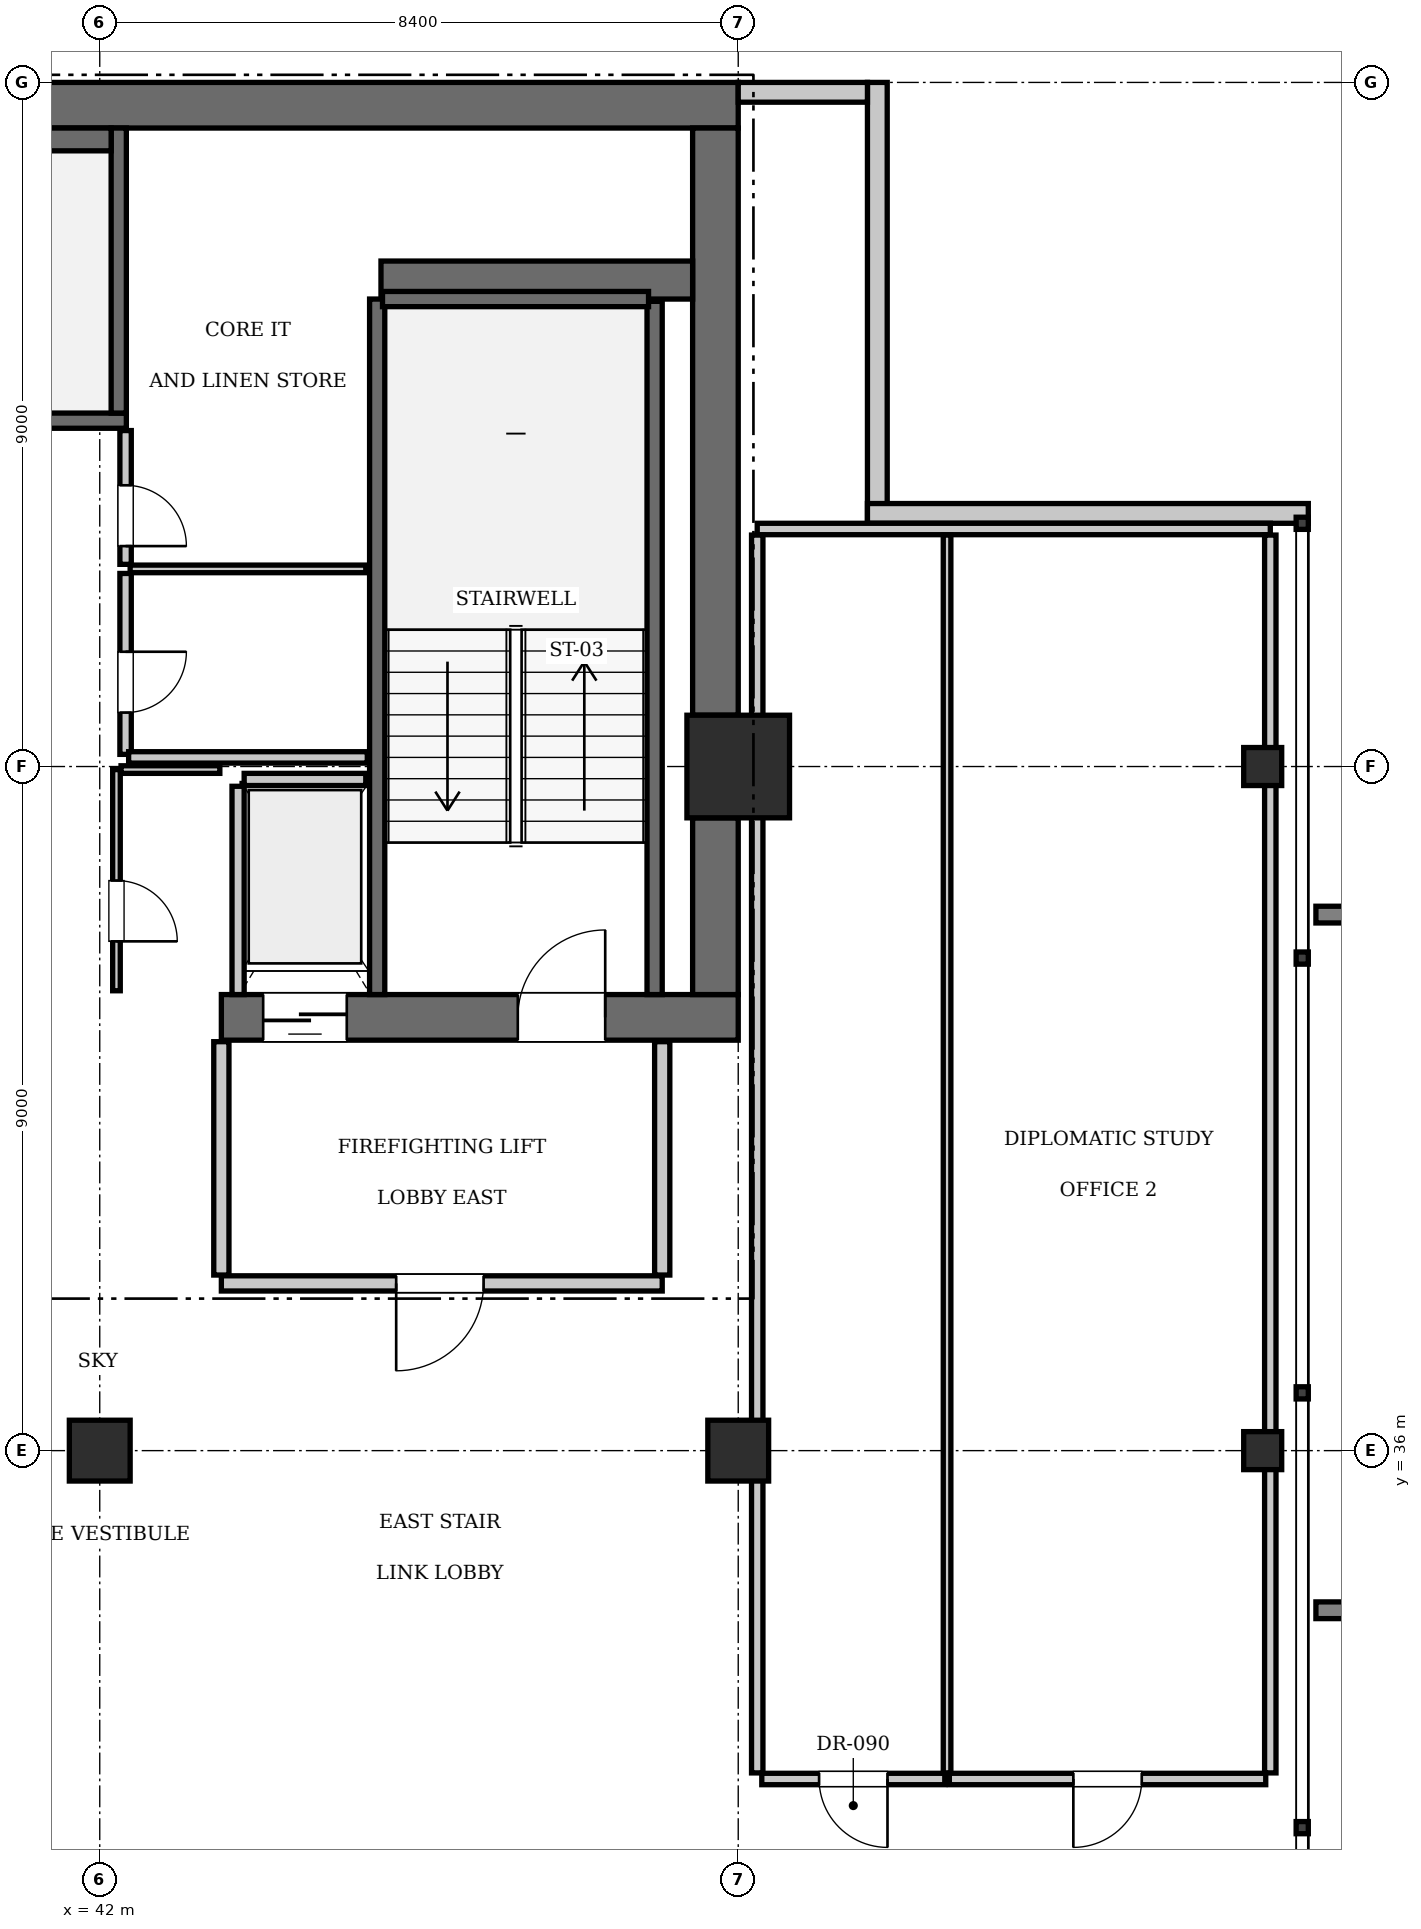
"""IFC4 building model, lengths in metres.
Left out: names, types, materials, properties, quantities, classifications, styles, units other than length and angle.
Written with IfcOpenShell. Run it as: python <this file> out.ifc"""

import sys

from ifc_helpers import new_model, si_unit, direction, frame, frame_2d, origin, origin_2d, place, context, subcontext, project, spatial, rectangle, i_section, extrude, element, fill, save


model = new_model("IFC4")
c1 = context("Model", 3, precision=1e-05, world=origin(), true_north=direction((0.0, 1.0)))
c2 = subcontext(c1, "Body", "Model", "MODEL_VIEW")
j1 = project(units=[si_unit("LENGTHUNIT", "METRE"), si_unit("PLANEANGLEUNIT", "RADIAN")], contexts=[c1])
p1 = place(None, origin())
s1 = spatial("IfcSite", under=j1, at=p1, CompositionType="ELEMENT")
p2 = place(p1, origin())
s2 = spatial("IfcBuilding", under=s1, at=p2, CompositionType="ELEMENT")
p3 = place(p2, frame((0.0, 0.0, 337.4)))
s3 = spatial("IfcBuildingStorey", under=s2, at=p3, CompositionType="ELEMENT", Elevation=337.4)
p4 = place(p3, frame((50.4, 45.0, 0.0), z_axis=(0.0, 0.0, 1.0), x_axis=(1.0, 0.0, 0.0)))
e1 = element("IfcColumn", 1, at=p4, inside=s3, PredefinedType="COLUMN", context=c2, shape_type="SweptSolid", body=[
    extrude(rectangle(XDim=1.35, YDim=1.35, at=origin_2d()), origin(), (0.0, 0.0, 1.0), 3.85),
])
p5 = place(p3, frame((25.2, 53.7, 0.0), z_axis=(0.0, 0.0, 1.0), x_axis=(1.0, 0.0, 0.0)))
e2 = element("IfcWall", 2, at=p5, inside=s3, PredefinedType="SHEAR", context=c2, shape_type="SweptSolid", body=[
    extrude(rectangle(XDim=25.2, YDim=0.6, at=frame_2d((12.6, 0.0))), origin(), (0.0, 0.0, 1.0), 3.85),
])
p6 = place(p3, frame((43.6, 41.7, 0.0), z_axis=(0.0, 0.0, 1.0), x_axis=(1.0, 0.0, 0.0)))
e3 = element("IfcWall", 3, at=p6, inside=s3, PredefinedType="SHEAR", context=c2, shape_type="SweptSolid", body=[
    extrude(rectangle(XDim=6.8, YDim=0.6, at=frame_2d((3.4, 0.0))), origin(), (0.0, 0.0, 1.0), 3.85),
])
p7 = place(p6, frame((3.9, 0.0, 0.0)))
e4 = element("IfcOpeningElement", 4, at=p7, cuts=e3, PredefinedType="OPENING", context=c2, shape_type="SweptSolid", body=[
    extrude(rectangle(XDim=1.15, YDim=2.15, at=frame_2d((0.575, 1.075))), frame((0.0, 0.31, 0.0), z_axis=(0.0, -1.0, 0.0), x_axis=(1.0, 0.0, 0.0)), (0.0, 0.0, 1.0), 0.62),
])
p8 = place(p6, frame((0.55, 0.0, 0.0)))
e5 = element("IfcOpeningElement", 5, at=p8, cuts=e3, PredefinedType="OPENING", context=c2, shape_type="SweptSolid", body=[
    extrude(rectangle(XDim=1.1, YDim=2.2, at=frame_2d((0.55, 1.1))), frame((0.0, 0.31, 0.0), z_axis=(0.0, -1.0, 0.0), x_axis=(1.0, 0.0, 0.0)), (0.0, 0.0, 1.0), 0.62),
])
p9 = place(p3, frame((50.1, 42.0, 0.0), z_axis=(0.0, 0.0, 1.0), x_axis=(0.0, 1.0, 0.0)))
e6 = element("IfcWall", 6, at=p9, inside=s3, PredefinedType="SHEAR", context=c2, shape_type="SweptSolid", body=[
    extrude(rectangle(XDim=2.325, YDim=0.6, at=frame_2d((1.163, 0.0))), origin(), (0.0, 0.0, 1.0), 3.85),
])
p10 = place(p3, frame((50.1, 45.675, 0.0), z_axis=(0.0, 0.0, 1.0), x_axis=(0.0, 1.0, 0.0)))
e7 = element("IfcWall", 7, at=p10, inside=s3, PredefinedType="SHEAR", context=c2, shape_type="SweptSolid", body=[
    extrude(rectangle(XDim=7.725, YDim=0.6, at=frame_2d((3.862, 0.0))), origin(), (0.0, 0.0, 1.0), 3.85),
])
p11 = place(p3, frame((45.7, 51.4, 0.0), z_axis=(0.0, 0.0, 1.0), x_axis=(1.0, 0.0, 0.0)))
e8 = element("IfcWall", 8, at=p11, inside=s3, PredefinedType="SHEAR", context=c2, shape_type="SweptSolid", body=[
    extrude(rectangle(XDim=4.1, YDim=0.5, at=frame_2d((2.05, 0.0))), origin(), (0.0, 0.0, 1.0), 3.85),
])
for number, where, z_axis, x_axis in (
    (9, (42.0, 36.0, 0.0), (0.0, 0.0, 1.0), (1.0, 0.0, 0.0)),
    (10, (50.4, 36.0, 0.0), (0.0, 0.0, 1.0), (1.0, 0.0, 0.0)),
):
    element("IfcColumn", number, at=place(p3, frame(where, z_axis=z_axis, x_axis=x_axis)), inside=s3, PredefinedType="COLUMN", context=c2, shape_type="SweptSolid", body=[
        extrude(rectangle(XDim=0.8, YDim=0.8, at=origin_2d()), origin(), (0.0, 0.0, 1.0), 3.85),
    ])
for number, where, z_axis, x_axis in (
    (11, (57.3, 36.0, 0.0), (0.0, 0.0, 1.0), (1.0, 0.0, 0.0)),
    (12, (57.3, 45.0, 0.0), (0.0, 0.0, 1.0), (1.0, 0.0, 0.0)),
):
    element("IfcColumn", number, at=place(p3, frame(where, z_axis=z_axis, x_axis=x_axis)), inside=s3, PredefinedType="COLUMN", context=c2, shape_type="SweptSolid", body=[
        extrude(i_section(OverallWidth=0.5, OverallDepth=0.5, WebThickness=0.022, FlangeThickness=0.032, at=origin_2d()), origin(), (0.0, 0.0, 1.0), 3.85),
    ])
p12 = place(p3, frame((33.25, 49.55, 0.0), z_axis=(0.0, 0.0, 1.0), x_axis=(1.0, 0.0, 0.0)))
e13 = element("IfcWall", 13, at=p12, inside=s3, PredefinedType="SOLIDWALL", context=c2, shape_type="SweptSolid", body=[
    extrude(rectangle(XDim=9.1, YDim=0.2, at=frame_2d((4.55, 0.0))), origin(), (0.0, 0.0, 1.0), 3.61),
])
p13 = place(p3, frame((42.25, 49.65, 0.0), z_axis=(0.0, 0.0, 1.0), x_axis=(0.0, 1.0, 0.0)))
e14 = element("IfcWall", 14, at=p13, inside=s3, PredefinedType="SOLIDWALL", context=c2, shape_type="SweptSolid", body=[
    extrude(rectangle(XDim=3.75, YDim=0.2, at=frame_2d((1.875, 0.0))), origin(), (0.0, 0.0, 1.0), 3.61),
])
p14 = place(p3, frame((33.45, 53.25, 0.0), z_axis=(0.0, 0.0, 1.0), x_axis=(1.0, 0.0, 0.0)))
e15 = element("IfcWall", 15, at=p14, inside=s3, PredefinedType="SOLIDWALL", context=c2, shape_type="SweptSolid", body=[
    extrude(rectangle(XDim=8.7, YDim=0.3, at=frame_2d((4.35, 0.0))), origin(), (0.0, 0.0, 1.0), 3.61),
])
p15 = place(p3, frame((45.65, 42.0, 0.0), z_axis=(0.0, 0.0, 1.0), x_axis=(0.0, 1.0, 0.0)))
e16 = element("IfcWall", 16, at=p15, inside=s3, PredefinedType="SOLIDWALL", context=c2, shape_type="SweptSolid", body=[
    extrude(rectangle(XDim=9.15, YDim=0.2, at=frame_2d((4.575, 0.0))), origin(), (0.0, 0.0, 1.0), 3.61),
])
p16 = place(p3, frame((49.3, 42.0, 0.0), z_axis=(0.0, 0.0, 1.0), x_axis=(0.0, 1.0, 0.0)))
e17 = element("IfcWall", 17, at=p16, inside=s3, PredefinedType="SOLIDWALL", context=c2, shape_type="SweptSolid", body=[
    extrude(rectangle(XDim=9.12, YDim=0.2, at=frame_2d((4.56, 0.0))), origin(), (0.0, 0.0, 1.0), 3.61),
])
p17 = place(p3, frame((45.72, 51.15, 0.0), z_axis=(0.0, 0.0, 1.0), x_axis=(1.0, 0.0, 0.0)))
e18 = element("IfcWall", 18, at=p17, inside=s3, PredefinedType="SOLIDWALL", context=c2, shape_type="SweptSolid", body=[
    extrude(rectangle(XDim=3.5, YDim=0.2, at=frame_2d((1.75, 0.0))), origin(), (0.0, 0.0, 1.0), 3.61),
])
p18 = place(p3, frame((43.9, 44.83, 0.0), z_axis=(0.0, 0.0, 1.0), x_axis=(1.0, 0.0, 0.0)))
e19 = element("IfcWall", 19, at=p18, inside=s3, PredefinedType="SOLIDWALL", context=c2, shape_type="SweptSolid", body=[
    extrude(rectangle(XDim=1.6, YDim=0.16, at=frame_2d((0.8, 0.0))), origin(), (0.0, 0.0, 1.0), 3.61),
])
p19 = place(p3, frame((43.82, 42.0, 0.0), z_axis=(0.0, 0.0, 1.0), x_axis=(0.0, 1.0, 0.0)))
e20 = element("IfcWall", 20, at=p19, inside=s3, PredefinedType="SOLIDWALL", context=c2, shape_type="SweptSolid", body=[
    extrude(rectangle(XDim=2.74, YDim=0.16, at=frame_2d((1.37, 0.0))), origin(), (0.0, 0.0, 1.0), 3.61),
])
p20 = place(p3, frame((52.23, 54.0, 0.0), z_axis=(0.0, 0.0, 1.0), x_axis=(0.0, -1.0, 0.0)))
e21 = element("IfcWall", 21, at=p20, inside=s3, PredefinedType="SOLIDWALL", context=c2, shape_type="SweptSolid", body=[
    extrude(rectangle(XDim=5.8, YDim=0.26, at=frame_2d((2.9, 0.0))), origin(), (0.0, 0.0, 1.0), 3.61),
])
p21 = place(p3, frame((52.1, 48.33, 0.0), z_axis=(0.0, 0.0, 1.0), x_axis=(1.0, 0.0, 0.0)))
e22 = element("IfcWall", 22, at=p21, inside=s3, PredefinedType="SOLIDWALL", context=c2, shape_type="SweptSolid", body=[
    extrude(rectangle(XDim=5.8, YDim=0.26, at=frame_2d((2.9, 0.0))), origin(), (0.0, 0.0, 1.0), 3.61),
])
p22 = place(p3, frame((52.1, 53.87, 0.0), z_axis=(0.0, 0.0, 1.0), x_axis=(-1.0, 0.0, 0.0)))
e23 = element("IfcWall", 23, at=p22, inside=s3, PredefinedType="SOLIDWALL", context=c2, shape_type="SweptSolid", body=[
    extrude(rectangle(XDim=1.7, YDim=0.26, at=frame_2d((0.85, 0.0))), origin(), (0.0, 0.0, 1.0), 3.61),
])
p23 = place(p3, frame((43.6, 38.2, 0.0), z_axis=(0.0, 0.0, 1.0), x_axis=(1.0, 0.0, 0.0)))
e24 = element("IfcWall", 24, at=p23, inside=s3, PredefinedType="PARTITIONING", context=c2, shape_type="SweptSolid", body=[
    extrude(rectangle(XDim=5.8, YDim=0.2, at=frame_2d((2.9, 0.0))), origin(), (0.0, 0.0, 1.0), 3.61),
])
p24 = place(p23, frame((2.3, 0.0, 0.0)))
e25 = element("IfcOpeningElement", 25, at=p24, cuts=e24, PredefinedType="OPENING", context=c2, shape_type="SweptSolid", body=[
    extrude(rectangle(XDim=1.15, YDim=2.15, at=frame_2d((0.575, 1.075))), frame((0.0, 0.11, 0.0), z_axis=(0.0, -1.0, 0.0), x_axis=(1.0, 0.0, 0.0)), (0.0, 0.0, 1.0), 0.22),
])
for number, where, z_axis, x_axis in (
    (26, (43.6, 38.31, 0.0), (0.0, 0.0, 1.0), (0.0, 1.0, 0.0)),
    (27, (49.4, 38.31, 0.0), (0.0, 0.0, 1.0), (0.0, 1.0, 0.0)),
):
    element("IfcWall", number, at=place(p3, frame(where, z_axis=z_axis, x_axis=x_axis)), inside=s3, PredefinedType="PARTITIONING", context=c2, shape_type="SweptSolid", body=[
        extrude(rectangle(XDim=3.07, YDim=0.2, at=frame_2d((1.535, 0.0))), origin(), (0.0, 0.0, 1.0), 3.61),
    ])
p25 = place(p3, frame((42.22, 42.05, 0.0), z_axis=(0.0, 0.0, 1.0), x_axis=(0.0, 1.0, 0.0)))
e28 = element("IfcWall", 28, at=p25, inside=s3, PredefinedType="PARTITIONING", context=c2, shape_type="SweptSolid", body=[
    extrude(rectangle(XDim=2.91, YDim=0.1, at=frame_2d((1.455, 0.0))), origin(), (0.0, 0.0, 1.0), 3.61),
])
p26 = place(p25, frame((0.65, 0.0, 0.0)))
e29 = element("IfcOpeningElement", 29, at=p26, cuts=e28, PredefinedType="OPENING", context=c2, shape_type="SweptSolid", body=[
    extrude(rectangle(XDim=0.8, YDim=2.05, at=frame_2d((0.4, 1.025))), frame((0.0, 0.06, 0.0), z_axis=(0.0, -1.0, 0.0), x_axis=(1.0, 0.0, 0.0)), (0.0, 0.0, 1.0), 0.12),
])
p27 = place(p3, frame((42.28, 44.96, 0.0), z_axis=(0.0, 0.0, 1.0), x_axis=(1.0, 0.0, 0.0)))
e30 = element("IfcWall", 30, at=p27, inside=s3, PredefinedType="PARTITIONING", context=c2, shape_type="SweptSolid", body=[
    extrude(rectangle(XDim=1.3, YDim=0.1, at=frame_2d((0.65, 0.0))), origin(), (0.0, 0.0, 1.0), 3.61),
])
p28 = place(p3, frame((42.34, 45.16, 0.0), z_axis=(0.0, 0.0, 1.0), x_axis=(0.0, 1.0, 0.0)))
e31 = element("IfcWall", 31, at=p28, inside=s3, PredefinedType="PARTITIONING", context=c2, shape_type="SweptSolid", body=[
    extrude(rectangle(XDim=2.38, YDim=0.15, at=frame_2d((1.19, 0.0))), origin(), (0.0, 0.0, 1.0), 3.61),
])
p29 = place(p28, frame((0.55, 0.0, 0.0)))
e32 = element("IfcOpeningElement", 32, at=p29, cuts=e31, PredefinedType="OPENING", context=c2, shape_type="SweptSolid", body=[
    extrude(rectangle(XDim=0.8, YDim=2.05, at=frame_2d((0.4, 1.025))), frame((0.0, 0.085, 0.0), z_axis=(0.0, -1.0, 0.0), x_axis=(1.0, 0.0, 0.0)), (0.0, 0.0, 1.0), 0.17),
])
p30 = place(p3, frame((42.34, 47.66, 0.0), z_axis=(0.0, 0.0, 1.0), x_axis=(0.0, 1.0, 0.0)))
e33 = element("IfcWall", 33, at=p30, inside=s3, PredefinedType="PARTITIONING", context=c2, shape_type="SweptSolid", body=[
    extrude(rectangle(XDim=1.76, YDim=0.15, at=frame_2d((0.88, 0.0))), origin(), (0.0, 0.0, 1.0), 3.61),
])
p31 = place(p30, frame((0.24, 0.0, 0.0)))
e34 = element("IfcOpeningElement", 34, at=p31, cuts=e33, PredefinedType="OPENING", context=c2, shape_type="SweptSolid", body=[
    extrude(rectangle(XDim=0.8, YDim=2.05, at=frame_2d((0.4, 1.025))), frame((0.0, 0.085, 0.0), z_axis=(0.0, -1.0, 0.0), x_axis=(1.0, 0.0, 0.0)), (0.0, 0.0, 1.0), 0.17),
])
p32 = place(p3, frame((42.4, 47.6, 0.0), z_axis=(0.0, 0.0, 1.0), x_axis=(1.0, 0.0, 0.0)))
e35 = element("IfcWall", 35, at=p32, inside=s3, PredefinedType="PARTITIONING", context=c2, shape_type="SweptSolid", body=[
    extrude(rectangle(XDim=3.1, YDim=0.1, at=frame_2d((1.55, 0.0))), origin(), (0.0, 0.0, 1.0), 3.61),
])
p33 = place(p3, frame((42.38, 45.12, 0.0), z_axis=(0.0, 0.0, 1.0), x_axis=(1.0, 0.0, 0.0)))
e36 = element("IfcWall", 36, at=p33, inside=s3, PredefinedType="PARTITIONING", context=c2, shape_type="SweptSolid", body=[
    extrude(rectangle(XDim=3.14, YDim=0.15, at=frame_2d((1.57, 0.0))), origin(), (0.0, 0.0, 1.0), 3.61),
])
p34 = place(p3, frame((50.65, 48.125, 0.0), z_axis=(0.0, 0.0, 1.0), x_axis=(1.0, 0.0, 0.0)))
e37 = element("IfcWall", 37, at=p34, inside=s3, PredefinedType="PARTITIONING", context=c2, shape_type="SweptSolid", body=[
    extrude(rectangle(XDim=6.75, YDim=0.15, at=frame_2d((3.375, 0.0))), origin(), (0.0, 0.0, 1.0), 3.61),
])
p35 = place(p3, frame((50.65, 31.76, 0.0), z_axis=(0.0, 0.0, 1.0), x_axis=(0.0, 1.0, 0.0)))
e38 = element("IfcWall", 38, at=p35, inside=s3, PredefinedType="PARTITIONING", context=c2, shape_type="SweptSolid", body=[
    extrude(rectangle(XDim=16.285, YDim=0.15, at=frame_2d((8.143, 0.0))), origin(), (0.0, 0.0, 1.0), 3.61),
])
p36 = place(p3, frame((57.4, 31.76, 0.0), z_axis=(0.0, 0.0, 1.0), x_axis=(0.0, 1.0, 0.0)))
e39 = element("IfcWall", 39, at=p36, inside=s3, PredefinedType="PARTITIONING", context=c2, shape_type="SweptSolid", body=[
    extrude(rectangle(XDim=16.285, YDim=0.15, at=frame_2d((8.143, 0.0))), origin(), (0.0, 0.0, 1.0), 3.141),
])
p37 = place(p3, frame((50.71, 31.68, 0.0), z_axis=(0.0, 0.0, 1.0), x_axis=(1.0, 0.0, 0.0)))
e40 = element("IfcWall", 40, at=p37, inside=s3, PredefinedType="PARTITIONING", context=c2, shape_type="SweptSolid", body=[
    extrude(rectangle(XDim=2.407, YDim=0.15, at=frame_2d((1.204, 0.0))), origin(), (0.0, 0.0, 1.0), 3.61),
])
p38 = place(p37, frame((0.754, 0.0, 0.0)))
e41 = element("IfcOpeningElement", 41, at=p38, cuts=e40, PredefinedType="OPENING", context=c2, shape_type="SweptSolid", body=[
    extrude(rectangle(XDim=0.9, YDim=2.1, at=frame_2d((0.45, 1.05))), frame((0.0, 0.085, 0.0), z_axis=(0.0, -1.0, 0.0), x_axis=(1.0, 0.0, 0.0)), (0.0, 0.0, 1.0), 0.17),
])
p39 = place(p3, frame((53.147, 31.76, 0.0), z_axis=(0.0, 0.0, 1.0), x_axis=(0.0, 1.0, 0.0)))
e42 = element("IfcWall", 42, at=p39, inside=s3, PredefinedType="PARTITIONING", context=c2, shape_type="SweptSolid", body=[
    extrude(rectangle(XDim=16.285, YDim=0.1, at=frame_2d((8.143, 0.0))), origin(), (0.0, 0.0, 1.0), 3.61),
])
p40 = place(p3, frame((53.177, 31.68, 0.0), z_axis=(0.0, 0.0, 1.0), x_axis=(1.0, 0.0, 0.0)))
e43 = element("IfcWall", 43, at=p40, inside=s3, PredefinedType="PARTITIONING", context=c2, shape_type="SweptSolid", body=[
    extrude(rectangle(XDim=4.163, YDim=0.15, at=frame_2d((2.081, 0.0))), origin(), (0.0, 0.0, 1.0), 3.61),
])
p41 = place(p40, frame((1.631, 0.0, 0.0)))
e44 = element("IfcOpeningElement", 44, at=p41, cuts=e43, PredefinedType="OPENING", context=c2, shape_type="SweptSolid", body=[
    extrude(rectangle(XDim=0.9, YDim=2.1, at=frame_2d((0.45, 1.05))), frame((0.0, 0.085, 0.0), z_axis=(0.0, -1.0, 0.0), x_axis=(1.0, 0.0, 0.0)), (0.0, 0.0, 1.0), 0.17),
])
p42 = place(p7, origin())
e45 = element("IfcDoor", 45, at=p42, inside=s3, OperationType="SINGLE_SWING_RIGHT", PredefinedType="DOOR", context=c2, shape_type="SweptSolid", body=[
    extrude(rectangle(XDim=1.15, YDim=2.15, at=frame_2d((0.575, 1.075))), frame((0.0, 0.025, 0.0), z_axis=(0.0, -1.0, 0.0), x_axis=(1.0, 0.0, 0.0)), (0.0, 0.0, 1.0), 0.05),
])
fill(e4, e45)
p43 = place(p8, frame((1.1, 0.0, 0.0), z_axis=(0.0, 0.0, 1.0), x_axis=(-1.0, 0.0, 0.0)))
e46 = element("IfcDoor", 46, at=p43, inside=s3, OperationType="SLIDING_TO_LEFT", PredefinedType="DOOR", context=c2, shape_type="SweptSolid", body=[
    extrude(rectangle(XDim=1.1, YDim=2.2, at=frame_2d((0.55, 1.1))), frame((0.0, 0.025, 0.0), z_axis=(0.0, -1.0, 0.0), x_axis=(1.0, 0.0, 0.0)), (0.0, 0.0, 1.0), 0.05),
])
fill(e5, e46)
p44 = place(p24, frame((1.15, 0.0, 0.0), z_axis=(0.0, 0.0, 1.0), x_axis=(-1.0, 0.0, 0.0)))
e47 = element("IfcDoor", 47, at=p44, inside=s3, OperationType="SINGLE_SWING_RIGHT", PredefinedType="DOOR", context=c2, shape_type="SweptSolid", body=[
    extrude(rectangle(XDim=1.15, YDim=2.15, at=frame_2d((0.575, 1.075))), frame((0.0, 0.025, 0.0), z_axis=(0.0, -1.0, 0.0), x_axis=(1.0, 0.0, 0.0)), (0.0, 0.0, 1.0), 0.05),
])
fill(e25, e47)
p45 = place(p26, frame((0.8, 0.0, 0.0), z_axis=(0.0, 0.0, 1.0), x_axis=(-1.0, 0.0, 0.0)))
e48 = element("IfcDoor", 48, at=p45, inside=s3, OperationType="SINGLE_SWING_RIGHT", PredefinedType="DOOR", context=c2, shape_type="SweptSolid", body=[
    extrude(rectangle(XDim=0.8, YDim=2.05, at=frame_2d((0.4, 1.025))), frame((0.0, 0.025, 0.0), z_axis=(0.0, -1.0, 0.0), x_axis=(1.0, 0.0, 0.0)), (0.0, 0.0, 1.0), 0.05),
])
fill(e29, e48)
p46 = place(p29, frame((0.8, 0.0, 0.0), z_axis=(0.0, 0.0, 1.0), x_axis=(-1.0, 0.0, 0.0)))
e49 = element("IfcDoor", 49, at=p46, inside=s3, OperationType="SINGLE_SWING_LEFT", PredefinedType="DOOR", context=c2, shape_type="SweptSolid", body=[
    extrude(rectangle(XDim=0.8, YDim=2.05, at=frame_2d((0.4, 1.025))), frame((0.0, 0.025, 0.0), z_axis=(0.0, -1.0, 0.0), x_axis=(1.0, 0.0, 0.0)), (0.0, 0.0, 1.0), 0.05),
])
fill(e32, e49)
p47 = place(p31, frame((0.8, 0.0, 0.0), z_axis=(0.0, 0.0, 1.0), x_axis=(-1.0, 0.0, 0.0)))
e50 = element("IfcDoor", 50, at=p47, inside=s3, OperationType="SINGLE_SWING_RIGHT", PredefinedType="DOOR", context=c2, shape_type="SweptSolid", body=[
    extrude(rectangle(XDim=0.8, YDim=2.05, at=frame_2d((0.4, 1.025))), frame((0.0, 0.025, 0.0), z_axis=(0.0, -1.0, 0.0), x_axis=(1.0, 0.0, 0.0)), (0.0, 0.0, 1.0), 0.05),
])
fill(e34, e50)
p48 = place(p38, frame((0.9, 0.0, 0.0), z_axis=(0.0, 0.0, 1.0), x_axis=(-1.0, 0.0, 0.0)))
e51 = element("IfcDoor", 51, at=p48, inside=s3, OperationType="SINGLE_SWING_LEFT", PredefinedType="DOOR", context=c2, shape_type="SweptSolid", body=[
    extrude(rectangle(XDim=0.9, YDim=2.1, at=frame_2d((0.45, 1.05))), frame((0.0, 0.025, 0.0), z_axis=(0.0, -1.0, 0.0), x_axis=(1.0, 0.0, 0.0)), (0.0, 0.0, 1.0), 0.05),
])
fill(e41, e51)
p49 = place(p41, frame((0.9, 0.0, 0.0), z_axis=(0.0, 0.0, 1.0), x_axis=(-1.0, 0.0, 0.0)))
e52 = element("IfcDoor", 52, at=p49, inside=s3, OperationType="SINGLE_SWING_RIGHT", PredefinedType="DOOR", context=c2, shape_type="SweptSolid", body=[
    extrude(rectangle(XDim=0.9, YDim=2.1, at=frame_2d((0.45, 1.05))), frame((0.0, 0.025, 0.0), z_axis=(0.0, -1.0, 0.0), x_axis=(1.0, 0.0, 0.0)), (0.0, 0.0, 1.0), 0.05),
])
fill(e44, e52)
save(model, sys.argv[1])
